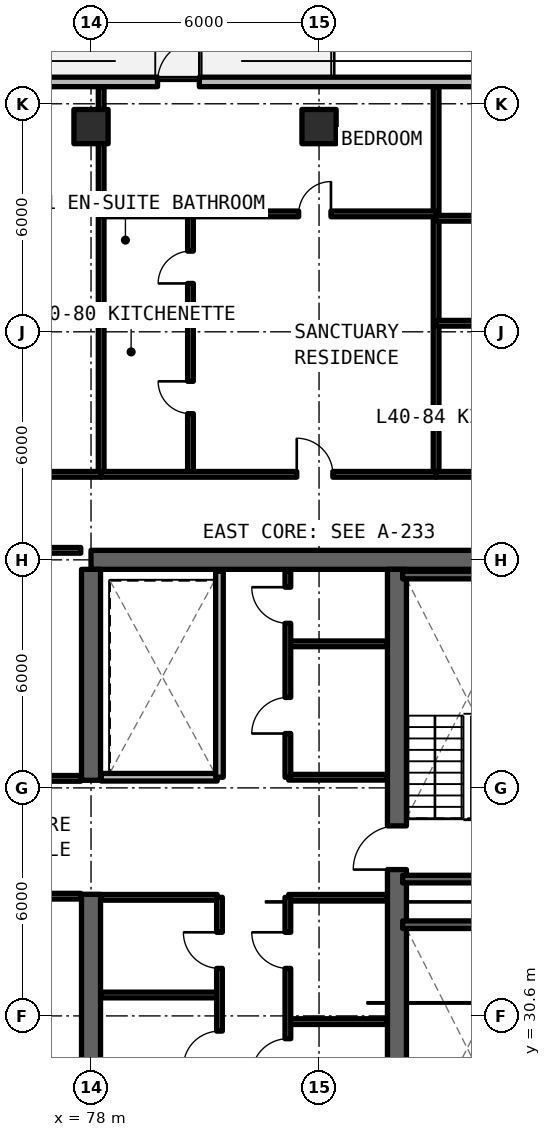
"""IFC4 building model, lengths in metres.
Left out: names, types, materials, properties, quantities, classifications, styles, units other than length and angle.
Written with IfcOpenShell. Run it as: python <this file> out.ifc"""

import sys

from ifc_helpers import new_model, si_unit, direction, frame, frame_2d, origin, origin_2d, place, context, subcontext, project, spatial, rectangle, extrude, element, fill, save


model = new_model("IFC4")
c1 = context("Model", 3, precision=1e-05, world=origin(), true_north=direction((0.0, 1.0)))
c2 = subcontext(c1, "Body", "Model", "MODEL_VIEW")
j1 = project(units=[si_unit("LENGTHUNIT", "METRE"), si_unit("PLANEANGLEUNIT", "RADIAN")], contexts=[c1])
p1 = place(None, origin())
s1 = spatial("IfcSite", under=j1, at=p1, CompositionType="ELEMENT")
p2 = place(p1, origin())
s2 = spatial("IfcBuilding", under=s1, at=p2, CompositionType="ELEMENT")
p3 = place(p2, frame((0.0, 0.0, 145.2)))
s3 = spatial("IfcBuildingStorey", under=s2, at=p3, CompositionType="ELEMENT", Elevation=145.2)
p4 = place(p3, frame((90.0, 42.6, 0.0), z_axis=(0.0, 0.0, 1.0), x_axis=(-1.0, 0.0, 0.0)))
e1 = element("IfcWall", 1, at=p4, inside=s3, PredefinedType="SHEAR", context=c2, shape_type="SweptSolid", body=[
    extrude(rectangle(XDim=12.0, YDim=0.5, at=frame_2d((6.0, 0.0))), origin(), (0.0, 0.0, 1.0), 3.3),
])
p5 = place(p3, frame((78.0, 24.85, 0.0), z_axis=(0.0, 0.0, 1.0), x_axis=(0.0, 1.0, 0.0)))
e2 = element("IfcWall", 2, at=p5, inside=s3, PredefinedType="SHEAR", context=c2, shape_type="SweptSolid", body=[
    extrude(rectangle(XDim=8.95, YDim=0.5, at=frame_2d((4.475, 0.0))), origin(), (0.0, 0.0, 1.0), 3.3),
])
p6 = place(p3, frame((78.0, 36.8, 0.0), z_axis=(0.0, 0.0, 1.0), x_axis=(0.0, 1.0, 0.0)))
e3 = element("IfcWall", 3, at=p6, inside=s3, PredefinedType="SHEAR", context=c2, shape_type="SweptSolid", body=[
    extrude(rectangle(XDim=5.55, YDim=0.5, at=frame_2d((2.775, 0.0))), origin(), (0.0, 0.0, 1.0), 3.3),
])
p7 = place(p3, frame((86.05, 24.85, 0.0), z_axis=(0.0, 0.0, 1.0), x_axis=(0.0, 1.0, 0.0)))
e4 = element("IfcWall", 4, at=p7, inside=s3, PredefinedType="SHEAR", context=c2, shape_type="SweptSolid", body=[
    extrude(rectangle(XDim=17.5, YDim=0.5, at=frame_2d((8.75, 0.0))), origin(), (0.0, 0.0, 1.0), 3.3),
])
p8 = place(p7, frame((0.4, 0.0, 0.0)))
e5 = element("IfcOpeningElement", 5, at=p8, cuts=e4, PredefinedType="OPENING", context=c2, shape_type="SweptSolid", body=[
    extrude(rectangle(XDim=1.15, YDim=2.15, at=frame_2d((0.575, 1.075))), frame((0.0, 0.26, 0.0), z_axis=(0.0, -1.0, 0.0), x_axis=(1.0, 0.0, 0.0)), (0.0, 0.0, 1.0), 0.52),
])
p9 = place(p7, frame((9.6, 0.0, 0.0)))
e6 = element("IfcOpeningElement", 6, at=p9, cuts=e4, PredefinedType="OPENING", context=c2, shape_type="SweptSolid", body=[
    extrude(rectangle(XDim=1.15, YDim=2.15, at=frame_2d((0.575, 1.075))), frame((0.0, 0.26, 0.0), z_axis=(0.0, -1.0, 0.0), x_axis=(1.0, 0.0, 0.0)), (0.0, 0.0, 1.0), 0.52),
])
for number, where, z_axis, x_axis in (
    (7, (78.0, 54.0, 0.0), (0.0, 0.0, 1.0), (1.0, 0.0, 0.0)),
    (8, (84.0, 54.0, 0.0), (0.0, 0.0, 1.0), (1.0, 0.0, 0.0)),
):
    element("IfcColumn", number, at=place(p3, frame(where, z_axis=z_axis, x_axis=x_axis)), inside=s3, PredefinedType="COLUMN", context=c2, shape_type="SweptSolid", body=[
        extrude(rectangle(XDim=0.9, YDim=0.9, at=origin_2d()), origin(), (0.0, 0.0, 1.0), 3.3),
    ])
p10 = place(p3, frame((95.748, 55.175, 0.0), z_axis=(0.0, 0.0, 1.0), x_axis=(-1.0, 0.0, 0.0)))
e9 = element("IfcWall", 9, at=p10, inside=s3, PredefinedType="SOLIDWALL", context=c2, shape_type="SweptSolid", body=[
    extrude(rectangle(XDim=43.623, YDim=0.25, at=frame_2d((21.812, 0.0))), origin(), (0.0, 0.0, 1.0), 3.08),
])
p11 = place(p10, frame((26.748, 0.0, 0.0)))
e10 = element("IfcOpeningElement", 10, at=p11, cuts=e9, PredefinedType="OPENING", context=c2, shape_type="SweptSolid", body=[
    extrude(rectangle(XDim=1.1, YDim=2.15, at=frame_2d((0.55, 1.075))), frame((0.0, 0.135, 0.0), z_axis=(0.0, -1.0, 0.0), x_axis=(1.0, 0.0, 0.0)), (0.0, 0.0, 1.0), 0.27),
])
p12 = place(p10, frame((14.898, 0.0, 0.0)))
e11 = element("IfcOpeningElement", 11, at=p12, cuts=e9, PredefinedType="OPENING", context=c2, shape_type="SweptSolid", body=[
    extrude(rectangle(XDim=1.1, YDim=2.15, at=frame_2d((0.55, 1.075))), frame((0.0, 0.135, 0.0), z_axis=(0.0, -1.0, 0.0), x_axis=(1.0, 0.0, 0.0)), (0.0, 0.0, 1.0), 0.27),
])
p13 = place(p10, frame((38.468, 0.0, 0.78)))
e12 = element("IfcOpeningElement", 12, at=p13, cuts=e9, PredefinedType="OPENING", context=c2, shape_type="SweptSolid", body=[
    extrude(rectangle(XDim=1.8, YDim=1.66, at=frame_2d((0.9, 0.83))), frame((0.0, 0.135, 0.0), z_axis=(0.0, -1.0, 0.0), x_axis=(1.0, 0.0, 0.0)), (0.0, 0.0, 1.0), 0.27),
])
p14 = place(p10, frame((20.841, 0.0, 0.78)))
e13 = element("IfcOpeningElement", 13, at=p14, cuts=e9, PredefinedType="OPENING", context=c2, shape_type="SweptSolid", body=[
    extrude(rectangle(XDim=1.8, YDim=1.66, at=frame_2d((0.9, 0.83))), frame((0.0, 0.135, 0.0), z_axis=(0.0, -1.0, 0.0), x_axis=(1.0, 0.0, 0.0)), (0.0, 0.0, 1.0), 0.27),
])
p15 = place(p10, frame((3.188, 0.0, 0.78)))
e14 = element("IfcOpeningElement", 14, at=p15, cuts=e9, PredefinedType="OPENING", context=c2, shape_type="SweptSolid", body=[
    extrude(rectangle(XDim=1.8, YDim=1.66, at=frame_2d((0.9, 0.83))), frame((0.0, 0.135, 0.0), z_axis=(0.0, -1.0, 0.0), x_axis=(1.0, 0.0, 0.0)), (0.0, 0.0, 1.0), 0.27),
])
for number, where, z_axis, x_axis in (
    (15, (83.2, 30.45, 0.0), (0.0, 0.0, 1.0), (1.0, 0.0, 0.0)),
    (16, (83.2, 33.72, 0.0), (0.0, 0.0, 1.0), (1.0, 0.0, 0.0)),
):
    element("IfcWall", number, at=place(p3, frame(where, z_axis=z_axis, x_axis=x_axis)), inside=s3, PredefinedType="SOLIDWALL", context=c2, shape_type="SweptSolid", body=[
        extrude(rectangle(XDim=2.58, YDim=0.15, at=frame_2d((1.29, 0.0))), origin(), (0.0, 0.0, 1.0), 2.35),
    ])
p16 = place(p3, frame((83.18, 28.5, 0.0), z_axis=(0.0, 0.0, 1.0), x_axis=(0.0, 1.0, 0.0)))
e17 = element("IfcWall", 17, at=p16, inside=s3, PredefinedType="SOLIDWALL", context=c2, shape_type="SweptSolid", body=[
    extrude(rectangle(XDim=5.22, YDim=0.15, at=frame_2d((2.61, 0.0))), origin(), (0.0, 0.0, 1.0), 2.35),
])
p17 = place(p16, frame((0.55, 0.0, 0.0)))
e18 = element("IfcOpeningElement", 18, at=p17, cuts=e17, PredefinedType="OPENING", context=c2, shape_type="SweptSolid", body=[
    extrude(rectangle(XDim=0.95, YDim=2.15, at=frame_2d((0.475, 1.075))), frame((0.0, 0.085, 0.0), z_axis=(0.0, -1.0, 0.0), x_axis=(1.0, 0.0, 0.0)), (0.0, 0.0, 1.0), 0.17),
])
p18 = place(p16, frame((3.35, 0.0, 0.0)))
e19 = element("IfcOpeningElement", 19, at=p18, cuts=e17, PredefinedType="OPENING", context=c2, shape_type="SweptSolid", body=[
    extrude(rectangle(XDim=0.95, YDim=2.15, at=frame_2d((0.475, 1.075))), frame((0.0, 0.085, 0.0), z_axis=(0.0, -1.0, 0.0), x_axis=(1.0, 0.0, 0.0)), (0.0, 0.0, 1.0), 0.17),
])
for number, where, z_axis, x_axis in (
    (20, (78.27, 31.15, 0.0), (0.0, 0.0, 1.0), (1.0, 0.0, 0.0)),
    (21, (78.27, 33.72, 0.0), (0.0, 0.0, 1.0), (1.0, 0.0, 0.0)),
):
    element("IfcWall", number, at=place(p3, frame(where, z_axis=z_axis, x_axis=x_axis)), inside=s3, PredefinedType="SOLIDWALL", context=c2, shape_type="SweptSolid", body=[
        extrude(rectangle(XDim=3.05, YDim=0.15, at=frame_2d((1.525, 0.0))), origin(), (0.0, 0.0, 1.0), 2.35),
    ])
p19 = place(p3, frame((81.38, 28.5, 0.0), z_axis=(0.0, 0.0, 1.0), x_axis=(0.0, 1.0, 0.0)))
e22 = element("IfcWall", 22, at=p19, inside=s3, PredefinedType="SOLIDWALL", context=c2, shape_type="SweptSolid", body=[
    extrude(rectangle(XDim=5.22, YDim=0.15, at=frame_2d((2.61, 0.0))), origin(), (0.0, 0.0, 1.0), 2.35),
])
p20 = place(p19, frame((0.75, 0.0, 0.0)))
e23 = element("IfcOpeningElement", 23, at=p20, cuts=e22, PredefinedType="OPENING", context=c2, shape_type="SweptSolid", body=[
    extrude(rectangle(XDim=0.95, YDim=2.15, at=frame_2d((0.475, 1.075))), frame((0.0, 0.085, 0.0), z_axis=(0.0, -1.0, 0.0), x_axis=(1.0, 0.0, 0.0)), (0.0, 0.0, 1.0), 0.17),
])
p21 = place(p19, frame((3.35, 0.0, 0.0)))
e24 = element("IfcOpeningElement", 24, at=p21, cuts=e22, PredefinedType="OPENING", context=c2, shape_type="SweptSolid", body=[
    extrude(rectangle(XDim=0.95, YDim=2.15, at=frame_2d((0.475, 1.075))), frame((0.0, 0.085, 0.0), z_axis=(0.0, -1.0, 0.0), x_axis=(1.0, 0.0, 0.0)), (0.0, 0.0, 1.0), 0.17),
])
for number, where, z_axis, x_axis in (
    (25, (83.2, 36.88, 0.0), (0.0, 0.0, 1.0), (1.0, 0.0, 0.0)),
    (26, (83.2, 40.39, 0.0), (0.0, 0.0, 1.0), (1.0, 0.0, 0.0)),
):
    element("IfcWall", number, at=place(p3, frame(where, z_axis=z_axis, x_axis=x_axis)), inside=s3, PredefinedType="SOLIDWALL", context=c2, shape_type="SweptSolid", body=[
        extrude(rectangle(XDim=2.58, YDim=0.15, at=frame_2d((1.29, 0.0))), origin(), (0.0, 0.0, 1.0), 2.35),
    ])
p22 = place(p3, frame((83.18, 36.88, 0.0), z_axis=(0.0, 0.0, 1.0), x_axis=(0.0, 1.0, 0.0)))
e27 = element("IfcWall", 27, at=p22, inside=s3, PredefinedType="SOLIDWALL", context=c2, shape_type="SweptSolid", body=[
    extrude(rectangle(XDim=5.42, YDim=0.15, at=frame_2d((2.71, 0.0))), origin(), (0.0, 0.0, 1.0), 2.35),
])
p23 = place(p22, frame((1.15, 0.0, 0.0)))
e28 = element("IfcOpeningElement", 28, at=p23, cuts=e27, PredefinedType="OPENING", context=c2, shape_type="SweptSolid", body=[
    extrude(rectangle(XDim=0.95, YDim=2.15, at=frame_2d((0.475, 1.075))), frame((0.0, 0.085, 0.0), z_axis=(0.0, -1.0, 0.0), x_axis=(1.0, 0.0, 0.0)), (0.0, 0.0, 1.0), 0.17),
])
p24 = place(p22, frame((4.05, 0.0, 0.0)))
e29 = element("IfcOpeningElement", 29, at=p24, cuts=e27, PredefinedType="OPENING", context=c2, shape_type="SweptSolid", body=[
    extrude(rectangle(XDim=0.95, YDim=2.15, at=frame_2d((0.475, 1.075))), frame((0.0, 0.085, 0.0), z_axis=(0.0, -1.0, 0.0), x_axis=(1.0, 0.0, 0.0)), (0.0, 0.0, 1.0), 0.17),
])
p25 = place(p3, frame((78.27, 36.88, 0.0), z_axis=(0.0, 0.0, 1.0), x_axis=(1.0, 0.0, 0.0)))
e30 = element("IfcWall", 30, at=p25, inside=s3, PredefinedType="SOLIDWALL", context=c2, shape_type="SweptSolid", body=[
    extrude(rectangle(XDim=3.05, YDim=0.2, at=frame_2d((1.525, 0.0))), origin(), (0.0, 0.0, 1.0), 2.35),
])
p26 = place(p3, frame((81.38, 36.88, 0.0), z_axis=(0.0, 0.0, 1.0), x_axis=(0.0, 1.0, 0.0)))
e31 = element("IfcWall", 31, at=p26, inside=s3, PredefinedType="SOLIDWALL", context=c2, shape_type="SweptSolid", body=[
    extrude(rectangle(XDim=5.42, YDim=0.2, at=frame_2d((2.71, 0.0))), origin(), (0.0, 0.0, 1.0), 2.35),
])
p27 = place(p3, frame((69.85, 33.75, 0.0), z_axis=(0.0, 0.0, 1.0), x_axis=(1.0, 0.0, 0.0)))
e32 = element("IfcWall", 32, at=p27, inside=s3, PredefinedType="SOLIDWALL", context=c2, shape_type="SweptSolid", body=[
    extrude(rectangle(XDim=7.88, YDim=0.15, at=frame_2d((3.94, 0.0))), origin(), (0.0, 0.0, 1.0), 2.35),
])
p28 = place(p27, frame((3.465, 0.0, 0.0)))
e33 = element("IfcOpeningElement", 33, at=p28, cuts=e32, PredefinedType="OPENING", context=c2, shape_type="SweptSolid", body=[
    extrude(rectangle(XDim=0.95, YDim=2.15, at=frame_2d((0.475, 1.075))), frame((0.0, 0.085, 0.0), z_axis=(0.0, -1.0, 0.0), x_axis=(1.0, 0.0, 0.0)), (0.0, 0.0, 1.0), 0.17),
])
p29 = place(p3, frame((69.85, 36.85, 0.0), z_axis=(0.0, 0.0, 1.0), x_axis=(1.0, 0.0, 0.0)))
e34 = element("IfcWall", 34, at=p29, inside=s3, PredefinedType="SOLIDWALL", context=c2, shape_type="SweptSolid", body=[
    extrude(rectangle(XDim=7.88, YDim=0.15, at=frame_2d((3.94, 0.0))), origin(), (0.0, 0.0, 1.0), 2.35),
])
p30 = place(p29, frame((3.465, 0.0, 0.0)))
e35 = element("IfcOpeningElement", 35, at=p30, cuts=e34, PredefinedType="OPENING", context=c2, shape_type="SweptSolid", body=[
    extrude(rectangle(XDim=0.95, YDim=2.15, at=frame_2d((0.475, 1.075))), frame((0.0, 0.085, 0.0), z_axis=(0.0, -1.0, 0.0), x_axis=(1.0, 0.0, 0.0)), (0.0, 0.0, 1.0), 0.17),
])
p31 = place(p3, frame((69.85, 42.85, 0.0), z_axis=(0.0, 0.0, 1.0), x_axis=(1.0, 0.0, 0.0)))
e36 = element("IfcWall", 36, at=p31, inside=s3, PredefinedType="SOLIDWALL", context=c2, shape_type="SweptSolid", body=[
    extrude(rectangle(XDim=7.88, YDim=0.15, at=frame_2d((3.94, 0.0))), origin(), (0.0, 0.0, 1.0), 2.35),
])
p32 = place(p3, frame((78.267, 44.85, 0.0), z_axis=(0.0, 0.0, 1.0), x_axis=(0.0, 1.0, 0.0)))
e37 = element("IfcWall", 37, at=p32, inside=s3, PredefinedType="SOLIDWALL", context=c2, shape_type="SweptSolid", body=[
    extrude(rectangle(XDim=10.2, YDim=0.15, at=frame_2d((5.1, 0.0))), origin(), (0.0, 0.0, 1.0), 2.35),
])
p33 = place(p3, frame((69.747, 44.85, 0.0), z_axis=(0.0, 0.0, 1.0), x_axis=(1.0, 0.0, 0.0)))
e38 = element("IfcWall", 38, at=p33, inside=s3, PredefinedType="SOLIDWALL", context=c2, shape_type="SweptSolid", body=[
    extrude(rectangle(XDim=8.52, YDim=0.15, at=frame_2d((4.26, 0.0))), origin(), (0.0, 0.0, 1.0), 2.35),
])
p34 = place(p33, frame((3.71, 0.0, 0.0)))
e39 = element("IfcOpeningElement", 39, at=p34, cuts=e38, PredefinedType="OPENING", context=c2, shape_type="SweptSolid", body=[
    extrude(rectangle(XDim=1.1, YDim=2.15, at=frame_2d((0.55, 1.075))), frame((0.0, 0.085, 0.0), z_axis=(0.0, -1.0, 0.0), x_axis=(1.0, 0.0, 0.0)), (0.0, 0.0, 1.0), 0.17),
])
p35 = place(p3, frame((87.08, 44.85, 0.0), z_axis=(0.0, 0.0, 1.0), x_axis=(0.0, 1.0, 0.0)))
e40 = element("IfcWall", 40, at=p35, inside=s3, PredefinedType="SOLIDWALL", context=c2, shape_type="SweptSolid", body=[
    extrude(rectangle(XDim=10.2, YDim=0.15, at=frame_2d((5.1, 0.0))), origin(), (0.0, 0.0, 1.0), 2.35),
])
p36 = place(p3, frame((78.267, 48.893, 0.0), z_axis=(0.0, 0.0, 1.0), x_axis=(1.0, 0.0, 0.0)))
e41 = element("IfcWall", 41, at=p36, inside=s3, PredefinedType="PARTITIONING", context=c2, shape_type="SweptSolid", body=[
    extrude(rectangle(XDim=2.35, YDim=0.15, at=frame_2d((1.175, 0.0))), origin(), (0.0, 0.0, 1.0), 2.35),
])
p37 = place(p3, frame((80.617, 44.85, 0.0), z_axis=(0.0, 0.0, 1.0), x_axis=(0.0, 1.0, 0.0)))
e42 = element("IfcWall", 42, at=p37, inside=s3, PredefinedType="PARTITIONING", context=c2, shape_type="SweptSolid", body=[
    extrude(rectangle(XDim=6.853, YDim=0.15, at=frame_2d((3.426, 0.0))), origin(), (0.0, 0.0, 1.0), 2.35),
])
p38 = place(p37, frame((1.597, 0.0, 0.0)))
e43 = element("IfcOpeningElement", 43, at=p38, cuts=e42, PredefinedType="OPENING", context=c2, shape_type="SweptSolid", body=[
    extrude(rectangle(XDim=0.85, YDim=2.1, at=frame_2d((0.425, 1.05))), frame((0.0, 0.085, 0.0), z_axis=(0.0, -1.0, 0.0), x_axis=(1.0, 0.0, 0.0)), (0.0, 0.0, 1.0), 0.17),
])
p39 = place(p37, frame((5.023, 0.0, 0.0)))
e44 = element("IfcOpeningElement", 44, at=p39, cuts=e42, PredefinedType="OPENING", context=c2, shape_type="SweptSolid", body=[
    extrude(rectangle(XDim=0.85, YDim=2.1, at=frame_2d((0.425, 1.05))), frame((0.0, 0.085, 0.0), z_axis=(0.0, -1.0, 0.0), x_axis=(1.0, 0.0, 0.0)), (0.0, 0.0, 1.0), 0.17),
])
p40 = place(p3, frame((78.267, 51.703, 0.0), z_axis=(0.0, 0.0, 1.0), x_axis=(1.0, 0.0, 0.0)))
e45 = element("IfcWall", 45, at=p40, inside=s3, PredefinedType="PARTITIONING", context=c2, shape_type="SweptSolid", body=[
    extrude(rectangle(XDim=8.813, YDim=0.15, at=frame_2d((4.407, 0.0))), origin(), (0.0, 0.0, 1.0), 2.35),
])
p41 = place(p40, frame((5.197, 0.0, 0.0)))
e46 = element("IfcOpeningElement", 46, at=p41, cuts=e45, PredefinedType="OPENING", context=c2, shape_type="SweptSolid", body=[
    extrude(rectangle(XDim=0.85, YDim=2.1, at=frame_2d((0.425, 1.05))), frame((0.0, 0.085, 0.0), z_axis=(0.0, -1.0, 0.0), x_axis=(1.0, 0.0, 0.0)), (0.0, 0.0, 1.0), 0.17),
])
p42 = place(p3, frame((78.267, 44.85, 0.0), z_axis=(0.0, 0.0, 1.0), x_axis=(1.0, 0.0, 0.0)))
e47 = element("IfcWall", 47, at=p42, inside=s3, PredefinedType="SOLIDWALL", context=c2, shape_type="SweptSolid", body=[
    extrude(rectangle(XDim=8.813, YDim=0.15, at=frame_2d((4.407, 0.0))), origin(), (0.0, 0.0, 1.0), 2.35),
])
p43 = place(p42, frame((5.147, 0.0, 0.0)))
e48 = element("IfcOpeningElement", 48, at=p43, cuts=e47, PredefinedType="OPENING", context=c2, shape_type="SweptSolid", body=[
    extrude(rectangle(XDim=0.95, YDim=2.15, at=frame_2d((0.475, 1.075))), frame((0.0, 0.085, 0.0), z_axis=(0.0, -1.0, 0.0), x_axis=(1.0, 0.0, 0.0)), (0.0, 0.0, 1.0), 0.17),
])
p44 = place(p3, frame((87.08, 48.825, 0.0), z_axis=(0.0, 0.0, 1.0), x_axis=(1.0, 0.0, 0.0)))
e49 = element("IfcWall", 49, at=p44, inside=s3, PredefinedType="PARTITIONING", context=c2, shape_type="SweptSolid", body=[
    extrude(rectangle(XDim=4.84, YDim=0.15, at=frame_2d((2.42, 0.0))), origin(), (0.0, 0.0, 1.0), 2.35),
])
p45 = place(p3, frame((87.08, 51.587, 0.0), z_axis=(0.0, 0.0, 1.0), x_axis=(1.0, 0.0, 0.0)))
e50 = element("IfcWall", 50, at=p45, inside=s3, PredefinedType="PARTITIONING", context=c2, shape_type="SweptSolid", body=[
    extrude(rectangle(XDim=8.52, YDim=0.15, at=frame_2d((4.26, 0.0))), origin(), (0.0, 0.0, 1.0), 2.35),
])
p46 = place(p45, frame((6.295, 0.0, 0.0)))
e51 = element("IfcOpeningElement", 51, at=p46, cuts=e50, PredefinedType="OPENING", context=c2, shape_type="SweptSolid", body=[
    extrude(rectangle(XDim=0.85, YDim=2.1, at=frame_2d((0.425, 1.05))), frame((0.0, 0.085, 0.0), z_axis=(0.0, -1.0, 0.0), x_axis=(1.0, 0.0, 0.0)), (0.0, 0.0, 1.0), 0.17),
])
p47 = place(p3, frame((87.08, 44.85, 0.0), z_axis=(0.0, 0.0, 1.0), x_axis=(1.0, 0.0, 0.0)))
e52 = element("IfcWall", 52, at=p47, inside=s3, PredefinedType="SOLIDWALL", context=c2, shape_type="SweptSolid", body=[
    extrude(rectangle(XDim=8.52, YDim=0.15, at=frame_2d((4.26, 0.0))), origin(), (0.0, 0.0, 1.0), 2.35),
])
p48 = place(p47, frame((6.245, 0.0, 0.0)))
e53 = element("IfcOpeningElement", 53, at=p48, cuts=e52, PredefinedType="OPENING", context=c2, shape_type="SweptSolid", body=[
    extrude(rectangle(XDim=0.95, YDim=2.15, at=frame_2d((0.475, 1.075))), frame((0.0, 0.085, 0.0), z_axis=(0.0, -1.0, 0.0), x_axis=(1.0, 0.0, 0.0)), (0.0, 0.0, 1.0), 0.17),
])
for number, where, z_axis, x_axis in (
    (54, (89.6, 33.0, 0.0), (0.0, 0.0, 1.0), (-1.0, 0.0, 0.0)),
    (55, (86.2, 34.2, 0.0), (0.0, 0.0, 1.0), (1.0, 0.0, 0.0)),
    (56, (89.6, 42.2, 0.0), (0.0, 0.0, 1.0), (-1.0, 0.0, 0.0)),
):
    element("IfcWall", number, at=place(p3, frame(where, z_axis=z_axis, x_axis=x_axis)), inside=s3, PredefinedType="SOLIDWALL", context=c2, shape_type="SweptSolid", body=[
        extrude(rectangle(XDim=3.4, YDim=0.2, at=frame_2d((1.7, 0.0))), origin(), (0.0, 0.0, 1.0), 3.3),
    ])
p49 = place(p12, frame((1.1, 0.0, 0.0), z_axis=(0.0, 0.0, 1.0), x_axis=(-1.0, 0.0, 0.0)))
e57 = element("IfcDoor", 57, at=p49, inside=s3, OperationType="SINGLE_SWING_LEFT", PredefinedType="DOOR", context=c2, shape_type="SweptSolid", body=[
    extrude(rectangle(XDim=1.1, YDim=2.15, at=frame_2d((0.55, 1.075))), frame((0.0, 0.025, 0.0), z_axis=(0.0, -1.0, 0.0), x_axis=(1.0, 0.0, 0.0)), (0.0, 0.0, 1.0), 0.05),
])
fill(e11, e57)
p50 = place(p17, origin())
e58 = element("IfcDoor", 58, at=p50, inside=s3, OperationType="SINGLE_SWING_LEFT", PredefinedType="DOOR", context=c2, shape_type="SweptSolid", body=[
    extrude(rectangle(XDim=0.95, YDim=2.15, at=frame_2d((0.475, 1.075))), frame((0.0, 0.025, 0.0), z_axis=(0.0, -1.0, 0.0), x_axis=(1.0, 0.0, 0.0)), (0.0, 0.0, 1.0), 0.05),
])
fill(e18, e58)
p51 = place(p18, origin())
e59 = element("IfcDoor", 59, at=p51, inside=s3, OperationType="SINGLE_SWING_RIGHT", PredefinedType="DOOR", context=c2, shape_type="SweptSolid", body=[
    extrude(rectangle(XDim=0.95, YDim=2.15, at=frame_2d((0.475, 1.075))), frame((0.0, 0.025, 0.0), z_axis=(0.0, -1.0, 0.0), x_axis=(1.0, 0.0, 0.0)), (0.0, 0.0, 1.0), 0.05),
])
fill(e19, e59)
p52 = place(p20, origin())
e60 = element("IfcDoor", 60, at=p52, inside=s3, OperationType="SINGLE_SWING_LEFT", PredefinedType="DOOR", context=c2, shape_type="SweptSolid", body=[
    extrude(rectangle(XDim=0.95, YDim=2.15, at=frame_2d((0.475, 1.075))), frame((0.0, 0.025, 0.0), z_axis=(0.0, -1.0, 0.0), x_axis=(1.0, 0.0, 0.0)), (0.0, 0.0, 1.0), 0.05),
])
fill(e23, e60)
p53 = place(p21, origin())
e61 = element("IfcDoor", 61, at=p53, inside=s3, OperationType="SINGLE_SWING_RIGHT", PredefinedType="DOOR", context=c2, shape_type="SweptSolid", body=[
    extrude(rectangle(XDim=0.95, YDim=2.15, at=frame_2d((0.475, 1.075))), frame((0.0, 0.025, 0.0), z_axis=(0.0, -1.0, 0.0), x_axis=(1.0, 0.0, 0.0)), (0.0, 0.0, 1.0), 0.05),
])
fill(e24, e61)
p54 = place(p23, origin())
e62 = element("IfcDoor", 62, at=p54, inside=s3, OperationType="SINGLE_SWING_LEFT", PredefinedType="DOOR", context=c2, shape_type="SweptSolid", body=[
    extrude(rectangle(XDim=0.95, YDim=2.15, at=frame_2d((0.475, 1.075))), frame((0.0, 0.025, 0.0), z_axis=(0.0, -1.0, 0.0), x_axis=(1.0, 0.0, 0.0)), (0.0, 0.0, 1.0), 0.05),
])
fill(e28, e62)
p55 = place(p24, origin())
e63 = element("IfcDoor", 63, at=p55, inside=s3, OperationType="SINGLE_SWING_RIGHT", PredefinedType="DOOR", context=c2, shape_type="SweptSolid", body=[
    extrude(rectangle(XDim=0.95, YDim=2.15, at=frame_2d((0.475, 1.075))), frame((0.0, 0.025, 0.0), z_axis=(0.0, -1.0, 0.0), x_axis=(1.0, 0.0, 0.0)), (0.0, 0.0, 1.0), 0.05),
])
fill(e29, e63)
p56 = place(p38, origin())
e64 = element("IfcDoor", 64, at=p56, inside=s3, OperationType="SINGLE_SWING_RIGHT", PredefinedType="DOOR", context=c2, shape_type="SweptSolid", body=[
    extrude(rectangle(XDim=0.85, YDim=2.1, at=frame_2d((0.425, 1.05))), frame((0.0, 0.025, 0.0), z_axis=(0.0, -1.0, 0.0), x_axis=(1.0, 0.0, 0.0)), (0.0, 0.0, 1.0), 0.05),
])
fill(e43, e64)
p57 = place(p39, origin())
e65 = element("IfcDoor", 65, at=p57, inside=s3, OperationType="SINGLE_SWING_LEFT", PredefinedType="DOOR", context=c2, shape_type="SweptSolid", body=[
    extrude(rectangle(XDim=0.85, YDim=2.1, at=frame_2d((0.425, 1.05))), frame((0.0, 0.025, 0.0), z_axis=(0.0, -1.0, 0.0), x_axis=(1.0, 0.0, 0.0)), (0.0, 0.0, 1.0), 0.05),
])
fill(e44, e65)
p58 = place(p41, origin())
e66 = element("IfcDoor", 66, at=p58, inside=s3, OperationType="SINGLE_SWING_RIGHT", PredefinedType="DOOR", context=c2, shape_type="SweptSolid", body=[
    extrude(rectangle(XDim=0.85, YDim=2.1, at=frame_2d((0.425, 1.05))), frame((0.0, 0.025, 0.0), z_axis=(0.0, -1.0, 0.0), x_axis=(1.0, 0.0, 0.0)), (0.0, 0.0, 1.0), 0.05),
])
fill(e46, e66)
p59 = place(p43, origin())
e67 = element("IfcDoor", 67, at=p59, inside=s3, OperationType="SINGLE_SWING_LEFT", PredefinedType="DOOR", context=c2, shape_type="SweptSolid", body=[
    extrude(rectangle(XDim=0.95, YDim=2.15, at=frame_2d((0.475, 1.075))), frame((0.0, 0.025, 0.0), z_axis=(0.0, -1.0, 0.0), x_axis=(1.0, 0.0, 0.0)), (0.0, 0.0, 1.0), 0.05),
])
fill(e48, e67)
p60 = place(p9, origin())
e68 = element("IfcDoor", 68, at=p60, inside=s3, OperationType="SINGLE_SWING_LEFT", PredefinedType="DOOR", context=c2, shape_type="SweptSolid", body=[
    extrude(rectangle(XDim=1.15, YDim=2.15, at=frame_2d((0.575, 1.075))), frame((0.0, 0.025, 0.0), z_axis=(0.0, -1.0, 0.0), x_axis=(1.0, 0.0, 0.0)), (0.0, 0.0, 1.0), 0.05),
])
fill(e6, e68)
save(model, sys.argv[1])
